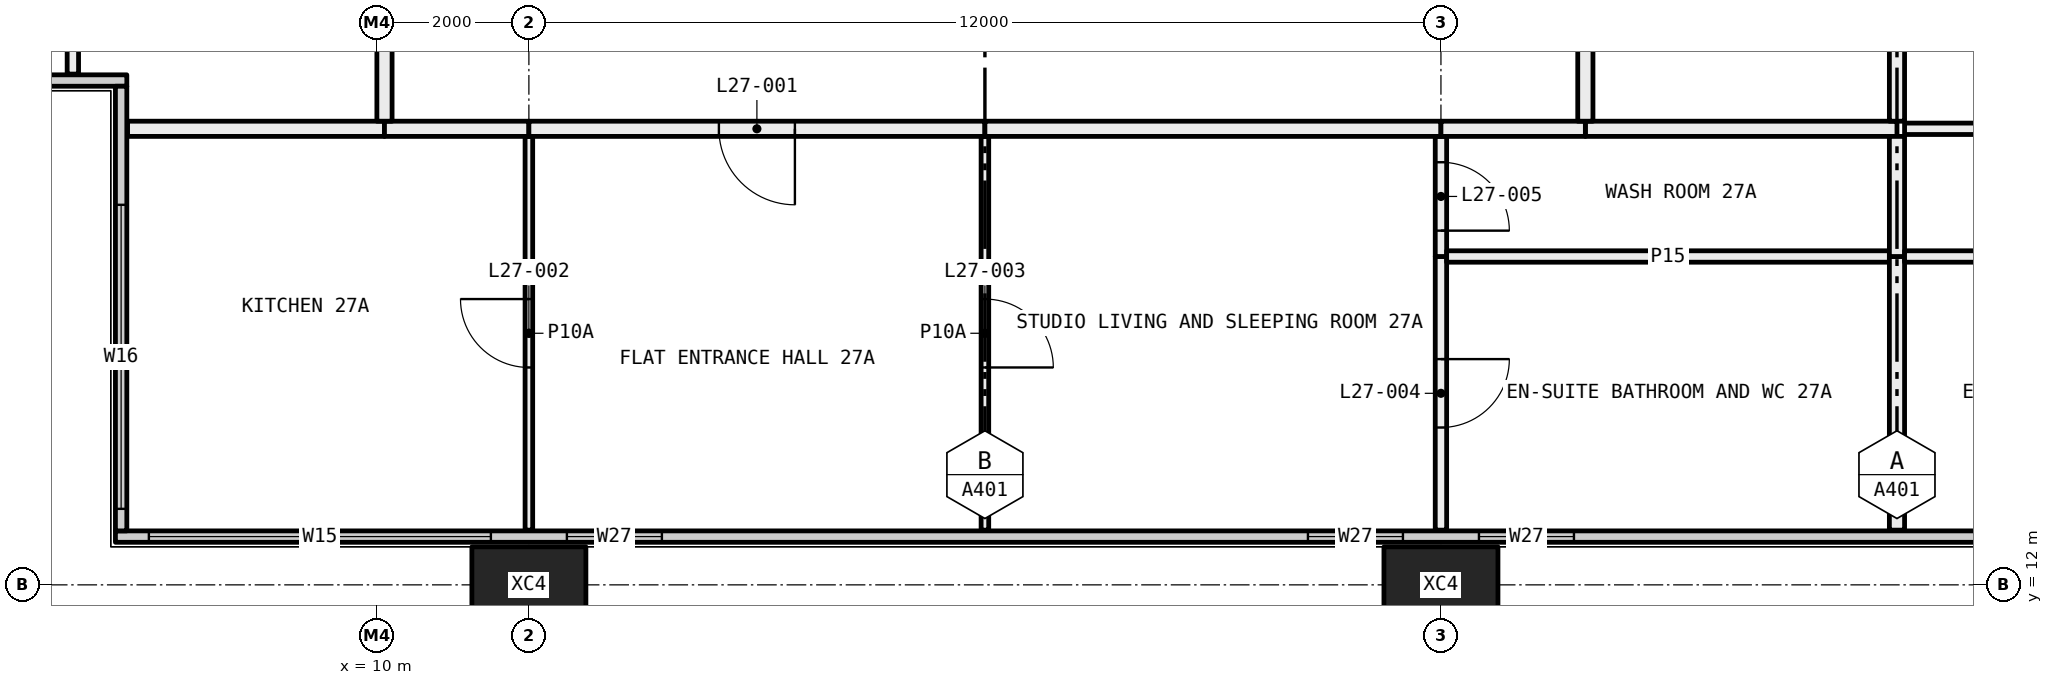
"""IFC4 building model, lengths in metres.
Left out: names, types, materials, properties, quantities, classifications, styles, units other than length and angle.
Written with IfcOpenShell. Run it as: python <this file> out.ifc"""

import sys

from ifc_helpers import new_model, si_unit, direction, frame, frame_2d, origin, origin_2d, place, context, subcontext, project, spatial, rectangle, hollow_rectangle, extrude, element, fill, save


model = new_model("IFC4")
c1 = context("Model", 3, precision=1e-05, world=origin(), true_north=direction((0.0, 1.0)))
c2 = subcontext(c1, "Body", "Model", "MODEL_VIEW")
j1 = project(units=[si_unit("LENGTHUNIT", "METRE"), si_unit("PLANEANGLEUNIT", "RADIAN")], contexts=[c1])
p1 = place(None, origin())
s1 = spatial("IfcSite", under=j1, at=p1, CompositionType="ELEMENT")
p2 = place(p1, origin())
s2 = spatial("IfcBuilding", under=s1, at=p2, CompositionType="ELEMENT")
p3 = place(p2, frame((0.0, 0.0, 106.95)))
s3 = spatial("IfcBuildingStorey", under=s2, at=p3, CompositionType="ELEMENT", Elevation=106.95)
for number, where, z_axis, x_axis in (
    (1, (12.0, 12.0, -0.4), (0.0, 0.0, 1.0), (1.0, 0.0, 0.0)),
    (2, (24.0, 12.0, -0.4), (0.0, 0.0, 1.0), (1.0, 0.0, 0.0)),
):
    element("IfcColumn", number, at=place(p3, frame(where, z_axis=z_axis, x_axis=x_axis)), inside=s3, PredefinedType="COLUMN", context=c2, shape_type="SweptSolid", body=[
        extrude(hollow_rectangle(XDim=1.5, YDim=1.0, WallThickness=0.06, at=origin_2d()), origin(), (0.0, 0.0, 1.0), 3.45),
    ])
p4 = place(p3, frame((6.56, 12.635, 0.0), z_axis=(0.0, 0.0, 1.0), x_axis=(1.0, 0.0, 0.0)))
e3 = element("IfcWall", 3, at=p4, inside=s3, PredefinedType="ELEMENTEDWALL", context=c2, shape_type="SweptSolid", body=[
    extrude(rectangle(XDim=58.88, YDim=0.15, at=frame_2d((29.44, 0.0))), origin(), (0.0, 0.0, 1.0), 3.05),
])
p5 = place(p4, frame((0.44, 0.0, 0.45)))
e4 = element("IfcOpeningElement", 4, at=p5, cuts=e3, PredefinedType="OPENING", context=c2, shape_type="SweptSolid", body=[
    extrude(rectangle(XDim=4.5, YDim=2.55, at=frame_2d((2.25, 1.275))), frame((0.0, 0.085, 0.0), z_axis=(0.0, -1.0, 0.0), x_axis=(1.0, 0.0, 0.0)), (0.0, 0.0, 1.0), 0.17),
])
p6 = place(p4, frame((5.94, 0.0, 0.45)))
e5 = element("IfcOpeningElement", 5, at=p6, cuts=e3, PredefinedType="OPENING", context=c2, shape_type="SweptSolid", body=[
    extrude(rectangle(XDim=1.25, YDim=2.55, at=frame_2d((0.625, 1.275))), frame((0.0, 0.085, 0.0), z_axis=(0.0, -1.0, 0.0), x_axis=(1.0, 0.0, 0.0)), (0.0, 0.0, 1.0), 0.17),
])
p7 = place(p4, frame((15.69, 0.0, 0.45)))
e6 = element("IfcOpeningElement", 6, at=p7, cuts=e3, PredefinedType="OPENING", context=c2, shape_type="SweptSolid", body=[
    extrude(rectangle(XDim=1.25, YDim=2.55, at=frame_2d((0.625, 1.275))), frame((0.0, 0.085, 0.0), z_axis=(0.0, -1.0, 0.0), x_axis=(1.0, 0.0, 0.0)), (0.0, 0.0, 1.0), 0.17),
])
p8 = place(p4, frame((17.94, 0.0, 0.45)))
e7 = element("IfcOpeningElement", 7, at=p8, cuts=e3, PredefinedType="OPENING", context=c2, shape_type="SweptSolid", body=[
    extrude(rectangle(XDim=1.25, YDim=2.55, at=frame_2d((0.625, 1.275))), frame((0.0, 0.085, 0.0), z_axis=(0.0, -1.0, 0.0), x_axis=(1.0, 0.0, 0.0)), (0.0, 0.0, 1.0), 0.17),
])
p9 = place(p4, frame((27.69, 0.0, 0.45)))
e8 = element("IfcOpeningElement", 8, at=p9, cuts=e3, PredefinedType="OPENING", context=c2, shape_type="SweptSolid", body=[
    extrude(rectangle(XDim=1.25, YDim=2.55, at=frame_2d((0.625, 1.275))), frame((0.0, 0.085, 0.0), z_axis=(0.0, -1.0, 0.0), x_axis=(1.0, 0.0, 0.0)), (0.0, 0.0, 1.0), 0.17),
])
p10 = place(p4, frame((29.94, 0.0, 0.45)))
e9 = element("IfcOpeningElement", 9, at=p10, cuts=e3, PredefinedType="OPENING", context=c2, shape_type="SweptSolid", body=[
    extrude(rectangle(XDim=1.25, YDim=2.55, at=frame_2d((0.625, 1.275))), frame((0.0, 0.085, 0.0), z_axis=(0.0, -1.0, 0.0), x_axis=(1.0, 0.0, 0.0)), (0.0, 0.0, 1.0), 0.17),
])
p11 = place(p4, frame((39.69, 0.0, 0.45)))
e10 = element("IfcOpeningElement", 10, at=p11, cuts=e3, PredefinedType="OPENING", context=c2, shape_type="SweptSolid", body=[
    extrude(rectangle(XDim=1.25, YDim=2.55, at=frame_2d((0.625, 1.275))), frame((0.0, 0.085, 0.0), z_axis=(0.0, -1.0, 0.0), x_axis=(1.0, 0.0, 0.0)), (0.0, 0.0, 1.0), 0.17),
])
p12 = place(p4, frame((41.94, 0.0, 0.45)))
e11 = element("IfcOpeningElement", 11, at=p12, cuts=e3, PredefinedType="OPENING", context=c2, shape_type="SweptSolid", body=[
    extrude(rectangle(XDim=1.25, YDim=2.55, at=frame_2d((0.625, 1.275))), frame((0.0, 0.085, 0.0), z_axis=(0.0, -1.0, 0.0), x_axis=(1.0, 0.0, 0.0)), (0.0, 0.0, 1.0), 0.17),
])
p13 = place(p4, frame((51.69, 0.0, 0.45)))
e12 = element("IfcOpeningElement", 12, at=p13, cuts=e3, PredefinedType="OPENING", context=c2, shape_type="SweptSolid", body=[
    extrude(rectangle(XDim=1.25, YDim=2.55, at=frame_2d((0.625, 1.275))), frame((0.0, 0.085, 0.0), z_axis=(0.0, -1.0, 0.0), x_axis=(1.0, 0.0, 0.0)), (0.0, 0.0, 1.0), 0.17),
])
p14 = place(p4, frame((53.94, 0.0, 0.45)))
e13 = element("IfcOpeningElement", 13, at=p14, cuts=e3, PredefinedType="OPENING", context=c2, shape_type="SweptSolid", body=[
    extrude(rectangle(XDim=4.5, YDim=2.55, at=frame_2d((2.25, 1.275))), frame((0.0, 0.085, 0.0), z_axis=(0.0, -1.0, 0.0), x_axis=(1.0, 0.0, 0.0)), (0.0, 0.0, 1.0), 0.17),
])
p15 = place(p3, frame((0.56, 18.635, 0.0), z_axis=(0.0, 0.0, 1.0), x_axis=(1.0, 0.0, 0.0)))
e14 = element("IfcWall", 14, at=p15, inside=s3, PredefinedType="ELEMENTEDWALL", context=c2, shape_type="SweptSolid", body=[
    extrude(rectangle(XDim=6.15, YDim=0.15, at=frame_2d((3.075, 0.0))), origin(), (0.0, 0.0, 1.0), 3.05),
])
p16 = place(p15, frame((0.44, 0.0, 0.45)))
e15 = element("IfcOpeningElement", 15, at=p16, cuts=e14, PredefinedType="OPENING", context=c2, shape_type="SweptSolid", body=[
    extrude(rectangle(XDim=4.0, YDim=2.55, at=frame_2d((2.0, 1.275))), frame((0.0, 0.085, 0.0), z_axis=(0.0, -1.0, 0.0), x_axis=(1.0, 0.0, 0.0)), (0.0, 0.0, 1.0), 0.17),
])
p17 = place(p3, frame((6.635, 12.71, 0.0), z_axis=(0.0, 0.0, 1.0), x_axis=(0.0, 1.0, 0.0)))
e16 = element("IfcWall", 16, at=p17, inside=s3, PredefinedType="ELEMENTEDWALL", context=c2, shape_type="SweptSolid", body=[
    extrude(rectangle(XDim=5.85, YDim=0.15, at=frame_2d((2.925, 0.0))), origin(), (0.0, 0.0, 1.0), 3.05),
])
p18 = place(p17, frame((0.29, 0.0, 0.45)))
e17 = element("IfcOpeningElement", 17, at=p18, cuts=e16, PredefinedType="OPENING", context=c2, shape_type="SweptSolid", body=[
    extrude(rectangle(XDim=4.0, YDim=2.55, at=frame_2d((2.0, 1.275))), frame((0.0, 0.085, 0.0), z_axis=(0.0, -1.0, 0.0), x_axis=(1.0, 0.0, 0.0)), (0.0, 0.0, 1.0), 0.17),
])
p19 = place(p3, frame((12.0, 12.72, 0.0), z_axis=(0.0, 0.0, 1.0), x_axis=(0.0, 1.0, 0.0)))
e18 = element("IfcWall", 18, at=p19, inside=s3, PredefinedType="PARTITIONING", context=c2, shape_type="SweptSolid", body=[
    extrude(rectangle(XDim=5.18, YDim=0.1, at=frame_2d((2.59, 0.0))), origin(), (0.0, 0.0, 1.0), 3.05),
])
p20 = place(p19, frame((2.14, 0.0, 0.0)))
e19 = element("IfcOpeningElement", 19, at=p20, cuts=e18, PredefinedType="OPENING", context=c2, shape_type="SweptSolid", body=[
    extrude(rectangle(XDim=0.9, YDim=2.1, at=frame_2d((0.45, 1.05))), frame((0.0, 0.06, 0.0), z_axis=(0.0, -1.0, 0.0), x_axis=(1.0, 0.0, 0.0)), (0.0, 0.0, 1.0), 0.12),
])
p21 = place(p3, frame((10.1, 18.0, 0.0), z_axis=(0.0, 0.0, 1.0), x_axis=(-1.0, 0.0, 0.0)))
e20 = element("IfcWall", 20, at=p21, inside=s3, PredefinedType="PARTITIONING", context=c2, shape_type="SweptSolid", body=[
    extrude(rectangle(XDim=3.38, YDim=0.2, at=frame_2d((1.69, 0.0))), origin(), (0.0, 0.0, 1.0), 3.05),
])
p22 = place(p3, frame((12.0, 18.0, 0.0), z_axis=(0.0, 0.0, 1.0), x_axis=(-1.0, 0.0, 0.0)))
e21 = element("IfcWall", 21, at=p22, inside=s3, PredefinedType="PARTITIONING", context=c2, shape_type="SweptSolid", body=[
    extrude(rectangle(XDim=1.9, YDim=0.2, at=frame_2d((0.95, 0.0))), origin(), (0.0, 0.0, 1.0), 3.05),
])
p23 = place(p3, frame((18.0, 12.72, 0.0), z_axis=(0.0, 0.0, 1.0), x_axis=(0.0, 1.0, 0.0)))
e22 = element("IfcWall", 22, at=p23, inside=s3, PredefinedType="PARTITIONING", context=c2, shape_type="SweptSolid", body=[
    extrude(rectangle(XDim=5.18, YDim=0.1, at=frame_2d((2.59, 0.0))), origin(), (0.0, 0.0, 1.0), 3.05),
])
p24 = place(p23, frame((2.14, 0.0, 0.0)))
e23 = element("IfcOpeningElement", 23, at=p24, cuts=e22, PredefinedType="OPENING", context=c2, shape_type="SweptSolid", body=[
    extrude(rectangle(XDim=0.9, YDim=2.1, at=frame_2d((0.45, 1.05))), frame((0.0, 0.06, 0.0), z_axis=(0.0, -1.0, 0.0), x_axis=(1.0, 0.0, 0.0)), (0.0, 0.0, 1.0), 0.12),
])
p25 = place(p3, frame((18.0, 18.0, 0.0), z_axis=(0.0, 0.0, 1.0), x_axis=(-1.0, 0.0, 0.0)))
e24 = element("IfcWall", 24, at=p25, inside=s3, PredefinedType="PARTITIONING", context=c2, shape_type="SweptSolid", body=[
    extrude(rectangle(XDim=6.0, YDim=0.2, at=frame_2d((3.0, 0.0))), origin(), (0.0, 0.0, 1.0), 3.05),
])
p26 = place(p25, frame((2.5, 0.0, 0.0)))
e25 = element("IfcOpeningElement", 25, at=p26, cuts=e24, PredefinedType="OPENING", context=c2, shape_type="SweptSolid", body=[
    extrude(rectangle(XDim=1.0, YDim=2.1, at=frame_2d((0.5, 1.05))), frame((0.0, 0.11, 0.0), z_axis=(0.0, -1.0, 0.0), x_axis=(1.0, 0.0, 0.0)), (0.0, 0.0, 1.0), 0.22),
])
p27 = place(p3, frame((24.0, 12.72, 0.0), z_axis=(0.0, 0.0, 1.0), x_axis=(0.0, 1.0, 0.0)))
e26 = element("IfcWall", 26, at=p27, inside=s3, PredefinedType="PARTITIONING", context=c2, shape_type="SweptSolid", body=[
    extrude(rectangle(XDim=3.6, YDim=0.15, at=frame_2d((1.8, 0.0))), origin(), (0.0, 0.0, 1.0), 3.05),
])
p28 = place(p27, frame((1.35, 0.0, 0.0)))
e27 = element("IfcOpeningElement", 27, at=p28, cuts=e26, PredefinedType="OPENING", context=c2, shape_type="SweptSolid", body=[
    extrude(rectangle(XDim=0.9, YDim=2.1, at=frame_2d((0.45, 1.05))), frame((0.0, 0.085, 0.0), z_axis=(0.0, -1.0, 0.0), x_axis=(1.0, 0.0, 0.0)), (0.0, 0.0, 1.0), 0.17),
])
p29 = place(p3, frame((24.0, 16.32, 0.0), z_axis=(0.0, 0.0, 1.0), x_axis=(0.0, 1.0, 0.0)))
e28 = element("IfcWall", 28, at=p29, inside=s3, PredefinedType="PARTITIONING", context=c2, shape_type="SweptSolid", body=[
    extrude(rectangle(XDim=1.58, YDim=0.15, at=frame_2d((0.79, 0.0))), origin(), (0.0, 0.0, 1.0), 3.05),
])
p30 = place(p29, frame((0.34, 0.0, 0.0)))
e29 = element("IfcOpeningElement", 29, at=p30, cuts=e28, PredefinedType="OPENING", context=c2, shape_type="SweptSolid", body=[
    extrude(rectangle(XDim=0.9, YDim=2.1, at=frame_2d((0.45, 1.05))), frame((0.0, 0.085, 0.0), z_axis=(0.0, -1.0, 0.0), x_axis=(1.0, 0.0, 0.0)), (0.0, 0.0, 1.0), 0.17),
])
p31 = place(p3, frame((24.0, 18.0, 0.0), z_axis=(0.0, 0.0, 1.0), x_axis=(-1.0, 0.0, 0.0)))
e30 = element("IfcWall", 30, at=p31, inside=s3, PredefinedType="PARTITIONING", context=c2, shape_type="SweptSolid", body=[
    extrude(rectangle(XDim=6.0, YDim=0.2, at=frame_2d((3.0, 0.0))), origin(), (0.0, 0.0, 1.0), 3.05),
])
p32 = place(p3, frame((29.9, 16.32, 0.0), z_axis=(0.0, 0.0, 1.0), x_axis=(-1.0, 0.0, 0.0)))
e31 = element("IfcWall", 31, at=p32, inside=s3, PredefinedType="PARTITIONING", context=c2, shape_type="SweptSolid", body=[
    extrude(rectangle(XDim=5.825, YDim=0.15, at=frame_2d((2.913, 0.0))), origin(), (0.0, 0.0, 1.0), 3.05),
])
p33 = place(p3, frame((30.0, 12.72, 0.0), z_axis=(0.0, 0.0, 1.0), x_axis=(0.0, 1.0, 0.0)))
e32 = element("IfcWall", 32, at=p33, inside=s3, PredefinedType="PARTITIONING", context=c2, shape_type="SweptSolid", body=[
    extrude(rectangle(XDim=3.6, YDim=0.2, at=frame_2d((1.8, 0.0))), origin(), (0.0, 0.0, 1.0), 3.05),
])
p34 = place(p3, frame((30.0, 18.0, 0.0), z_axis=(0.0, 0.0, 1.0), x_axis=(-1.0, 0.0, 0.0)))
e33 = element("IfcWall", 33, at=p34, inside=s3, PredefinedType="PARTITIONING", context=c2, shape_type="SweptSolid", body=[
    extrude(rectangle(XDim=4.1, YDim=0.2, at=frame_2d((2.05, 0.0))), origin(), (0.0, 0.0, 1.0), 3.05),
])
p35 = place(p3, frame((30.0, 16.32, 0.0), z_axis=(0.0, 0.0, 1.0), x_axis=(0.0, 1.0, 0.0)))
e34 = element("IfcWall", 34, at=p35, inside=s3, PredefinedType="PARTITIONING", context=c2, shape_type="SweptSolid", body=[
    extrude(rectangle(XDim=1.58, YDim=0.2, at=frame_2d((0.79, 0.0))), origin(), (0.0, 0.0, 1.0), 3.05),
])
p36 = place(p3, frame((25.9, 18.0, 0.0), z_axis=(0.0, 0.0, 1.0), x_axis=(-1.0, 0.0, 0.0)))
e35 = element("IfcWall", 35, at=p36, inside=s3, PredefinedType="PARTITIONING", context=c2, shape_type="SweptSolid", body=[
    extrude(rectangle(XDim=1.9, YDim=0.2, at=frame_2d((0.95, 0.0))), origin(), (0.0, 0.0, 1.0), 3.05),
])
p37 = place(p3, frame((30.0, 18.1, 0.0), z_axis=(0.0, 0.0, 1.0), x_axis=(0.0, 1.0, 0.0)))
e36 = element("IfcWall", 36, at=p37, inside=s3, PredefinedType="PARTITIONING", context=c2, shape_type="SweptSolid", body=[
    extrude(rectangle(XDim=6.2, YDim=0.2, at=frame_2d((3.1, 0.0))), origin(), (0.0, 0.0, 1.0), 2.45),
])
p38 = place(p3, frame((25.9, 23.9, 0.0), z_axis=(0.0, 0.0, 1.0), x_axis=(0.0, -1.0, 0.0)))
e37 = element("IfcWall", 37, at=p38, inside=s3, PredefinedType="PARTITIONING", context=c2, shape_type="SweptSolid", body=[
    extrude(rectangle(XDim=5.8, YDim=0.2, at=frame_2d((2.9, 0.0))), origin(), (0.0, 0.0, 1.0), 3.05),
])
p39 = place(p38, frame((2.45, 0.0, 0.0)))
e38 = element("IfcOpeningElement", 38, at=p39, cuts=e37, PredefinedType="OPENING", context=c2, shape_type="SweptSolid", body=[
    extrude(rectangle(XDim=0.9, YDim=2.1, at=frame_2d((0.45, 1.05))), frame((0.0, 0.11, 0.0), z_axis=(0.0, -1.0, 0.0), x_axis=(1.0, 0.0, 0.0)), (0.0, 0.0, 1.0), 0.22),
])
p40 = place(p3, frame((6.0, 18.72, 0.0), z_axis=(0.0, 0.0, 1.0), x_axis=(0.0, 1.0, 0.0)))
e39 = element("IfcWall", 39, at=p40, inside=s3, PredefinedType="PARTITIONING", context=c2, shape_type="SweptSolid", body=[
    extrude(rectangle(XDim=2.28, YDim=0.15, at=frame_2d((1.14, 0.0))), origin(), (0.0, 0.0, 1.0), 3.05),
])
p41 = place(p3, frame((10.1, 18.1, 0.0), z_axis=(0.0, 0.0, 1.0), x_axis=(0.0, 1.0, 0.0)))
e40 = element("IfcWall", 40, at=p41, inside=s3, PredefinedType="PARTITIONING", context=c2, shape_type="SweptSolid", body=[
    extrude(rectangle(XDim=2.9, YDim=0.2, at=frame_2d((1.45, 0.0))), origin(), (0.0, 0.0, 1.0), 3.05),
])
p42 = place(p3, frame((36.0, 16.32, 0.0), z_axis=(0.0, 0.0, 1.0), x_axis=(-1.0, 0.0, 0.0)))
e41 = element("IfcWall", 41, at=p42, inside=s3, PredefinedType="PARTITIONING", context=c2, shape_type="SweptSolid", body=[
    extrude(rectangle(XDim=5.9, YDim=0.15, at=frame_2d((2.95, 0.0))), origin(), (0.0, 0.0, 1.0), 2.45),
])
p43 = place(p3, frame((35.925, 18.0, 0.0), z_axis=(0.0, 0.0, 1.0), x_axis=(-1.0, 0.0, 0.0)))
e42 = element("IfcWall", 42, at=p43, inside=s3, PredefinedType="PARTITIONING", context=c2, shape_type="SweptSolid", body=[
    extrude(rectangle(XDim=5.825, YDim=0.15, at=frame_2d((2.913, 0.0))), origin(), (0.0, 0.0, 1.0), 2.45),
])
p44 = place(p5, origin())
e43 = element("IfcWindow", 43, at=p44, inside=s3, PartitioningType="SINGLE_PANEL", PredefinedType="WINDOW", context=c2, shape_type="SweptSolid", body=[
    extrude(rectangle(XDim=4.5, YDim=2.55, at=frame_2d((2.25, 1.275))), frame((0.0, 0.03, 0.0), z_axis=(0.0, -1.0, 0.0), x_axis=(1.0, 0.0, 0.0)), (0.0, 0.0, 1.0), 0.06),
])
fill(e4, e43)
p45 = place(p6, origin())
e44 = element("IfcWindow", 44, at=p45, inside=s3, PartitioningType="SINGLE_PANEL", PredefinedType="WINDOW", context=c2, shape_type="SweptSolid", body=[
    extrude(rectangle(XDim=1.25, YDim=2.55, at=frame_2d((0.625, 1.275))), frame((0.0, 0.03, 0.0), z_axis=(0.0, -1.0, 0.0), x_axis=(1.0, 0.0, 0.0)), (0.0, 0.0, 1.0), 0.06),
])
fill(e5, e44)
p46 = place(p7, origin())
e45 = element("IfcWindow", 45, at=p46, inside=s3, PartitioningType="SINGLE_PANEL", PredefinedType="WINDOW", context=c2, shape_type="SweptSolid", body=[
    extrude(rectangle(XDim=1.25, YDim=2.55, at=frame_2d((0.625, 1.275))), frame((0.0, 0.03, 0.0), z_axis=(0.0, -1.0, 0.0), x_axis=(1.0, 0.0, 0.0)), (0.0, 0.0, 1.0), 0.06),
])
fill(e6, e45)
p47 = place(p8, origin())
e46 = element("IfcWindow", 46, at=p47, inside=s3, PartitioningType="SINGLE_PANEL", PredefinedType="WINDOW", context=c2, shape_type="SweptSolid", body=[
    extrude(rectangle(XDim=1.25, YDim=2.55, at=frame_2d((0.625, 1.275))), frame((0.0, 0.03, 0.0), z_axis=(0.0, -1.0, 0.0), x_axis=(1.0, 0.0, 0.0)), (0.0, 0.0, 1.0), 0.06),
])
fill(e7, e46)
p48 = place(p18, origin())
e47 = element("IfcWindow", 47, at=p48, inside=s3, PartitioningType="SINGLE_PANEL", PredefinedType="WINDOW", context=c2, shape_type="SweptSolid", body=[
    extrude(rectangle(XDim=4.0, YDim=2.55, at=frame_2d((2.0, 1.275))), frame((0.0, 0.03, 0.0), z_axis=(0.0, -1.0, 0.0), x_axis=(1.0, 0.0, 0.0)), (0.0, 0.0, 1.0), 0.06),
])
fill(e17, e47)
p49 = place(p26, origin())
e48 = element("IfcDoor", 48, at=p49, inside=s3, OperationType="SINGLE_SWING_RIGHT", PredefinedType="DOOR", context=c2, shape_type="SweptSolid", body=[
    extrude(rectangle(XDim=1.0, YDim=2.1, at=frame_2d((0.5, 1.05))), frame((0.0, 0.025, 0.0), z_axis=(0.0, -1.0, 0.0), x_axis=(1.0, 0.0, 0.0)), (0.0, 0.0, 1.0), 0.05),
])
fill(e25, e48)
p50 = place(p20, origin())
e49 = element("IfcDoor", 49, at=p50, inside=s3, OperationType="SINGLE_SWING_LEFT", PredefinedType="DOOR", context=c2, shape_type="SweptSolid", body=[
    extrude(rectangle(XDim=0.9, YDim=2.1, at=frame_2d((0.45, 1.05))), frame((0.0, 0.025, 0.0), z_axis=(0.0, -1.0, 0.0), x_axis=(1.0, 0.0, 0.0)), (0.0, 0.0, 1.0), 0.05),
])
fill(e19, e49)
p51 = place(p24, frame((0.9, 0.0, 0.0), x_axis=(-1.0, 0.0, 0.0)))
e50 = element("IfcDoor", 50, at=p51, inside=s3, OperationType="SINGLE_SWING_LEFT", PredefinedType="DOOR", context=c2, shape_type="SweptSolid", body=[
    extrude(rectangle(XDim=0.9, YDim=2.1, at=frame_2d((0.45, 1.05))), frame((0.0, 0.025, 0.0), z_axis=(0.0, -1.0, 0.0), x_axis=(1.0, 0.0, 0.0)), (0.0, 0.0, 1.0), 0.05),
])
fill(e23, e50)
p52 = place(p28, frame((0.9, 0.0, 0.0), x_axis=(-1.0, 0.0, 0.0)))
e51 = element("IfcDoor", 51, at=p52, inside=s3, OperationType="SINGLE_SWING_RIGHT", PredefinedType="DOOR", context=c2, shape_type="SweptSolid", body=[
    extrude(rectangle(XDim=0.9, YDim=2.1, at=frame_2d((0.45, 1.05))), frame((0.0, 0.025, 0.0), z_axis=(0.0, -1.0, 0.0), x_axis=(1.0, 0.0, 0.0)), (0.0, 0.0, 1.0), 0.05),
])
fill(e27, e51)
p53 = place(p30, frame((0.9, 0.0, 0.0), x_axis=(-1.0, 0.0, 0.0)))
e52 = element("IfcDoor", 52, at=p53, inside=s3, OperationType="SINGLE_SWING_LEFT", PredefinedType="DOOR", context=c2, shape_type="SweptSolid", body=[
    extrude(rectangle(XDim=0.9, YDim=2.1, at=frame_2d((0.45, 1.05))), frame((0.0, 0.025, 0.0), z_axis=(0.0, -1.0, 0.0), x_axis=(1.0, 0.0, 0.0)), (0.0, 0.0, 1.0), 0.05),
])
fill(e29, e52)
save(model, sys.argv[1])
